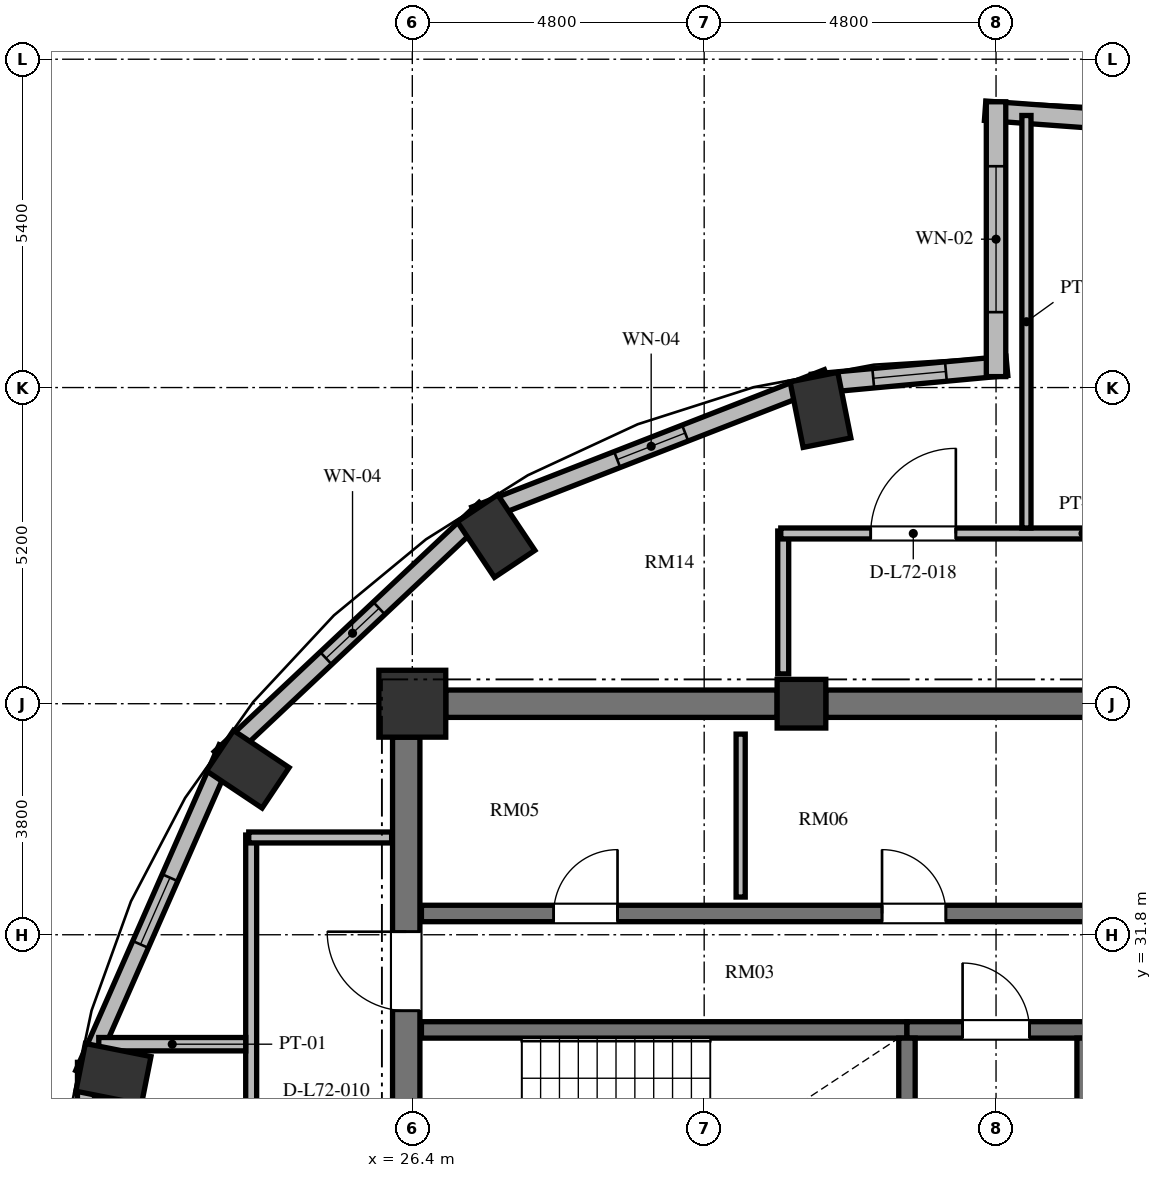
"""IFC4 building model, lengths in metres.
Left out: names, types, materials, properties, quantities, classifications, styles, units other than length and angle.
Written with IfcOpenShell. Run it as: python <this file> out.ifc"""

import sys

from ifc_helpers import new_model, si_unit, direction, frame, frame_2d, origin, origin_2d, place, context, subcontext, project, spatial, rectangle, extrude, element, fill, save


model = new_model("IFC4")
c1 = context("Model", 3, precision=1e-05, world=origin(), true_north=direction((0.0, 1.0)))
c2 = subcontext(c1, "Body", "Model", "MODEL_VIEW")
j1 = project(units=[si_unit("LENGTHUNIT", "METRE"), si_unit("PLANEANGLEUNIT", "RADIAN")], contexts=[c1])
p1 = place(None, origin())
s1 = spatial("IfcSite", under=j1, at=p1, CompositionType="ELEMENT")
p2 = place(p1, origin())
s2 = spatial("IfcBuilding", under=s1, at=p2, CompositionType="ELEMENT")
p3 = place(p2, frame((0.0, 0.0, 276.912)))
s3 = spatial("IfcBuildingStorey", under=s2, at=p3, CompositionType="ELEMENT", Elevation=276.912)
for number, where, z_axis, x_axis in (
    (1, (33.113, 40.433, 0.0), (0.0, 0.0, 1.0), (-0.195, 0.981, 0.0)),
    (2, (27.778, 38.357, 0.0), (0.0, 0.0, 1.0), (-0.556, 0.831, 0.0)),
    (3, (23.694, 34.522, 0.0), (0.0, 0.0, 1.0), (-0.831, 0.556, 0.0)),
    (4, (21.484, 29.512, 0.0), (0.0, 0.0, 1.0), (-0.981, 0.195, 0.0)),
):
    element("IfcColumn", number, at=place(p3, frame(where, z_axis=z_axis, x_axis=x_axis)), inside=s3, PredefinedType="COLUMN", context=c2, shape_type="SweptSolid", body=[
        extrude(rectangle(XDim=1.1, YDim=0.8, at=origin_2d()), origin(), (0.0, 0.0, 1.0), 3.648),
    ])
p4 = place(p3, frame((32.8, 35.6, 0.0), z_axis=(0.0, 0.0, 1.0), x_axis=(1.0, 0.0, 0.0)))
e5 = element("IfcColumn", 5, at=p4, inside=s3, PredefinedType="COLUMN", context=c2, shape_type="SweptSolid", body=[
    extrude(rectangle(XDim=0.8, YDim=0.8, at=origin_2d()), origin(), (0.0, 0.0, 1.0), 3.648),
])
p5 = place(p3, frame((26.4, 35.6, 0.0), z_axis=(0.0, 0.0, 1.0), x_axis=(1.0, 0.0, 0.0)))
e6 = element("IfcColumn", 6, at=p5, inside=s3, PredefinedType="COLUMN", context=c2, shape_type="SweptSolid", body=[
    extrude(rectangle(XDim=1.1, YDim=1.1, at=origin_2d()), origin(), (0.0, 0.0, 1.0), 3.648),
])
p6 = place(p3, frame((26.3, 20.95, 0.0), z_axis=(0.0, 0.0, 1.0), x_axis=(0.0, 1.0, 0.0)))
e7 = element("IfcWall", 7, at=p6, inside=s3, PredefinedType="SHEAR", context=c2, shape_type="SweptSolid", body=[
    extrude(rectangle(XDim=14.1, YDim=0.45, at=frame_2d((7.05, 0.0))), origin(), (0.0, 0.0, 1.0), 3.648),
])
p7 = place(p6, frame((6.5, 0.0, 0.0)))
e8 = element("IfcOpeningElement", 8, at=p7, cuts=e7, PredefinedType="OPENING", context=c2, shape_type="SweptSolid", body=[
    extrude(rectangle(XDim=1.2, YDim=2.15, at=frame_2d((0.6, 1.075))), frame((0.0, 0.235, 0.0), z_axis=(0.0, -1.0, 0.0), x_axis=(1.0, 0.0, 0.0)), (0.0, 0.0, 1.0), 0.47),
])
p8 = place(p6, frame((9.6, 0.0, 0.0)))
e9 = element("IfcOpeningElement", 9, at=p8, cuts=e7, PredefinedType="OPENING", context=c2, shape_type="SweptSolid", body=[
    extrude(rectangle(XDim=1.3, YDim=2.2, at=frame_2d((0.65, 1.1))), frame((0.0, 0.235, 0.0), z_axis=(0.0, -1.0, 0.0), x_axis=(1.0, 0.0, 0.0)), (0.0, 0.0, 1.0), 0.47),
])
p9 = place(p6, frame((3.26, 0.0, 0.0)))
e10 = element("IfcOpeningElement", 10, at=p9, cuts=e7, PredefinedType="OPENING", context=c2, shape_type="SweptSolid", body=[
    extrude(rectangle(XDim=1.3, YDim=2.2, at=frame_2d((0.65, 1.1))), frame((0.0, 0.235, 0.0), z_axis=(0.0, -1.0, 0.0), x_axis=(1.0, 0.0, 0.0)), (0.0, 0.0, 1.0), 0.47),
])
p10 = place(p3, frame((26.95, 35.6, 0.0), z_axis=(0.0, 0.0, 1.0), x_axis=(1.0, 0.0, 0.0)))
e11 = element("IfcWall", 11, at=p10, inside=s3, PredefinedType="SHEAR", context=c2, shape_type="SweptSolid", body=[
    extrude(rectangle(XDim=5.45, YDim=0.45, at=frame_2d((2.725, 0.0))), origin(), (0.0, 0.0, 1.0), 3.648),
])
p11 = place(p3, frame((33.2, 35.6, 0.0), z_axis=(0.0, 0.0, 1.0), x_axis=(1.0, 0.0, 0.0)))
e12 = element("IfcWall", 12, at=p11, inside=s3, PredefinedType="SHEAR", context=c2, shape_type="SweptSolid", body=[
    extrude(rectangle(XDim=5.6, YDim=0.45, at=frame_2d((2.8, 0.0))), origin(), (0.0, 0.0, 1.0), 3.648),
])
p12 = place(p3, frame((33.228, 40.964, 0.0), z_axis=(0.0, 0.0, 1.0), x_axis=(-0.931716550814, -0.36318627306, 0.0)))
e13 = element("IfcWall", 13, at=p12, inside=s3, PredefinedType="SOLIDWALL", context=c2, shape_type="SweptSolid", body=[
    extrude(rectangle(XDim=6.224, YDim=0.28, at=frame_2d((3.112, 0.0))), origin(), (0.0, 0.0, 1.0), 3.448),
])
p13 = place(p12, frame((2.512, 0.0, 0.85)))
e14 = element("IfcOpeningElement", 14, at=p13, cuts=e13, PredefinedType="OPENING", context=c2, shape_type="SweptSolid", body=[
    extrude(rectangle(XDim=1.2, YDim=1.8, at=frame_2d((0.6, 0.9))), frame((0.0, 0.15, 0.0), z_axis=(0.0, -1.0, 0.0), x_axis=(1.0, 0.0, 0.0)), (0.0, 0.0, 1.0), 0.3),
])
p14 = place(p3, frame((27.595, 38.808, 0.0), z_axis=(0.0, 0.0, 1.0), x_axis=(-0.728251519923, -0.685309947199, 0.0)))
e15 = element("IfcWall", 15, at=p14, inside=s3, PredefinedType="SOLIDWALL", context=c2, shape_type="SweptSolid", body=[
    extrude(rectangle(XDim=5.981, YDim=0.28, at=frame_2d((2.99, 0.0))), origin(), (0.0, 0.0, 1.0), 3.448),
])
p15 = place(p14, frame((2.391, 0.0, 0.85)))
e16 = element("IfcOpeningElement", 16, at=p15, cuts=e15, PredefinedType="OPENING", context=c2, shape_type="SweptSolid", body=[
    extrude(rectangle(XDim=1.2, YDim=1.8, at=frame_2d((0.6, 0.9))), frame((0.0, 0.15, 0.0), z_axis=(0.0, -1.0, 0.0), x_axis=(1.0, 0.0, 0.0)), (0.0, 0.0, 1.0), 0.3),
])
p16 = place(p3, frame((23.352, 34.869, 0.0), z_axis=(0.0, 0.0, 1.0), x_axis=(-0.402882523888, -0.915251698685, 0.0)))
e17 = element("IfcWall", 17, at=p16, inside=s3, PredefinedType="SOLIDWALL", context=c2, shape_type="SweptSolid", body=[
    extrude(rectangle(XDim=5.856, YDim=0.28, at=frame_2d((2.928, 0.0))), origin(), (0.0, 0.0, 1.0), 3.448),
])
p17 = place(p16, frame((2.328, 0.0, 0.85)))
e18 = element("IfcOpeningElement", 18, at=p17, cuts=e17, PredefinedType="OPENING", context=c2, shape_type="SweptSolid", body=[
    extrude(rectangle(XDim=1.2, YDim=1.8, at=frame_2d((0.6, 0.9))), frame((0.0, 0.15, 0.0), z_axis=(0.0, -1.0, 0.0), x_axis=(1.0, 0.0, 0.0)), (0.0, 0.0, 1.0), 0.3),
])
p18 = place(p3, frame((21.033, 29.701, 0.0), z_axis=(0.0, 0.0, 1.0), x_axis=(0.0, -1.0, 0.0)))
e19 = element("IfcWall", 19, at=p18, inside=s3, PredefinedType="SOLIDWALL", context=c2, shape_type="SweptSolid", body=[
    extrude(rectangle(XDim=5.803, YDim=0.28, at=frame_2d((2.901, 0.0))), origin(), (0.0, 0.0, 1.0), 3.448),
])
p19 = place(p18, frame((2.187, 0.0, 0.85)))
e20 = element("IfcOpeningElement", 20, at=p19, cuts=e19, PredefinedType="OPENING", context=c2, shape_type="SweptSolid", body=[
    extrude(rectangle(XDim=1.2, YDim=1.8, at=frame_2d((0.6, 0.9))), frame((0.0, 0.15, 0.0), z_axis=(0.0, -1.0, 0.0), x_axis=(1.0, 0.0, 0.0)), (0.0, 0.0, 1.0), 0.3),
])
p20 = place(p3, frame((40.35, 45.026, 0.0), z_axis=(0.0, 0.0, 1.0), x_axis=(-0.997412917451, 0.071885131294, 0.0)))
e21 = element("IfcWall", 21, at=p20, inside=s3, PredefinedType="SOLIDWALL", context=c2, shape_type="SweptSolid", body=[
    extrude(rectangle(XDim=4.541, YDim=0.32, at=frame_2d((2.271, 0.0))), origin(), (0.0, 0.0, 1.0), 3.448),
])
p21 = place(p20, frame((1.67, 0.0, 0.85)))
e22 = element("IfcOpeningElement", 22, at=p21, cuts=e21, PredefinedType="OPENING", context=c2, shape_type="SweptSolid", body=[
    extrude(rectangle(XDim=1.2, YDim=2.2, at=frame_2d((0.6, 1.1))), frame((0.0, 0.17, 0.0), z_axis=(0.0, -1.0, 0.0), x_axis=(1.0, 0.0, 0.0)), (0.0, 0.0, 1.0), 0.34),
])
p22 = place(p3, frame((36.179, 41.156, 0.0), z_axis=(0.0, 0.0, 1.0), x_axis=(-0.995736155144, -0.092247001792, 0.0)))
e23 = element("IfcWall", 23, at=p22, inside=s3, PredefinedType="SOLIDWALL", context=c2, shape_type="SweptSolid", body=[
    extrude(rectangle(XDim=3.216, YDim=0.32, at=frame_2d((1.608, 0.0))), origin(), (0.0, 0.0, 1.0), 3.448),
])
p23 = place(p22, frame((1.008, 0.0, 0.85)))
e24 = element("IfcOpeningElement", 24, at=p23, cuts=e23, PredefinedType="OPENING", context=c2, shape_type="SweptSolid", body=[
    extrude(rectangle(XDim=1.2, YDim=1.8, at=frame_2d((0.6, 0.9))), frame((0.0, 0.17, 0.0), z_axis=(0.0, -1.0, 0.0), x_axis=(1.0, 0.0, 0.0)), (0.0, 0.0, 1.0), 0.34),
])
p24 = place(p3, frame((36.0, 45.5, 0.0), z_axis=(0.0, 0.0, 1.0), x_axis=(0.0, -1.0, 0.0)))
e25 = element("IfcWall", 25, at=p24, inside=s3, PredefinedType="SOLIDWALL", context=c2, shape_type="SweptSolid", body=[
    extrude(rectangle(XDim=4.52, YDim=0.32, at=frame_2d((2.26, 0.0))), origin(), (0.0, 0.0, 1.0), 3.448),
])
p25 = place(p24, frame((1.06, 0.0, 0.84)))
e26 = element("IfcOpeningElement", 26, at=p25, cuts=e25, PredefinedType="OPENING", context=c2, shape_type="SweptSolid", body=[
    extrude(rectangle(XDim=2.4, YDim=2.04, at=frame_2d((1.2, 1.02))), frame((0.0, 0.17, 0.0), z_axis=(0.0, -1.0, 0.0), x_axis=(1.0, 0.0, 0.0)), (0.0, 0.0, 1.0), 0.34),
])
p26 = place(p3, frame((26.55, 30.235, 0.0), z_axis=(0.0, 0.0, 1.0), x_axis=(1.0, 0.0, 0.0)))
e27 = element("IfcWall", 27, at=p26, inside=s3, PredefinedType="SHEAR", context=c2, shape_type="SweptSolid", body=[
    extrude(rectangle(XDim=7.985, YDim=0.27, at=frame_2d((3.992, 0.0))), origin(), (0.0, 0.0, 1.0), 3.648),
])
p27 = place(p3, frame((34.535, 30.235, 0.0), z_axis=(0.0, 0.0, 1.0), x_axis=(1.0, 0.0, 0.0)))
e28 = element("IfcWall", 28, at=p27, inside=s3, PredefinedType="SHEAR", context=c2, shape_type="SweptSolid", body=[
    extrude(rectangle(XDim=2.93, YDim=0.27, at=frame_2d((1.465, 0.0))), origin(), (0.0, 0.0, 1.0), 3.648),
])
p28 = place(p27, frame((0.915, 0.0, 0.0)))
e29 = element("IfcOpeningElement", 29, at=p28, cuts=e28, PredefinedType="OPENING", context=c2, shape_type="SweptSolid", body=[
    extrude(rectangle(XDim=1.1, YDim=2.15, at=frame_2d((0.55, 1.075))), frame((0.0, 0.145, 0.0), z_axis=(0.0, -1.0, 0.0), x_axis=(1.0, 0.0, 0.0)), (0.0, 0.0, 1.0), 0.29),
])
for number, where, z_axis, x_axis in (
    (30, (34.535, 26.02, 0.0), (0.0, 0.0, 1.0), (0.0, 1.0, 0.0)),
    (31, (37.465, 26.02, 0.0), (0.0, 0.0, 1.0), (0.0, 1.0, 0.0)),
):
    element("IfcWall", number, at=place(p3, frame(where, z_axis=z_axis, x_axis=x_axis)), inside=s3, PredefinedType="SHEAR", context=c2, shape_type="SweptSolid", body=[
        extrude(rectangle(XDim=4.08, YDim=0.27, at=frame_2d((2.04, 0.0))), origin(), (0.0, 0.0, 1.0), 3.648),
    ])
p29 = place(p3, frame((26.55, 32.15, 0.0), z_axis=(0.0, 0.0, 1.0), x_axis=(1.0, 0.0, 0.0)))
e32 = element("IfcWall", 32, at=p29, inside=s3, PredefinedType="SHEAR", context=c2, shape_type="SweptSolid", body=[
    extrude(rectangle(XDim=16.4, YDim=0.27, at=frame_2d((8.2, 0.0))), origin(), (0.0, 0.0, 1.0), 3.648),
])
p30 = place(p29, frame((2.175, 0.0, 0.0)))
e33 = element("IfcOpeningElement", 33, at=p30, cuts=e32, PredefinedType="OPENING", context=c2, shape_type="SweptSolid", body=[
    extrude(rectangle(XDim=1.05, YDim=2.15, at=frame_2d((0.525, 1.075))), frame((0.0, 0.145, 0.0), z_axis=(0.0, -1.0, 0.0), x_axis=(1.0, 0.0, 0.0)), (0.0, 0.0, 1.0), 0.29),
])
p31 = place(p29, frame((7.575, 0.0, 0.0)))
e34 = element("IfcOpeningElement", 34, at=p31, cuts=e32, PredefinedType="OPENING", context=c2, shape_type="SweptSolid", body=[
    extrude(rectangle(XDim=1.05, YDim=2.15, at=frame_2d((0.525, 1.075))), frame((0.0, 0.145, 0.0), z_axis=(0.0, -1.0, 0.0), x_axis=(1.0, 0.0, 0.0)), (0.0, 0.0, 1.0), 0.29),
])
p32 = place(p29, frame((11.9, 0.0, 0.0)))
e35 = element("IfcOpeningElement", 35, at=p32, cuts=e32, PredefinedType="OPENING", context=c2, shape_type="SweptSolid", body=[
    extrude(rectangle(XDim=1.1, YDim=2.2, at=frame_2d((0.55, 1.1))), frame((0.0, 0.145, 0.0), z_axis=(0.0, -1.0, 0.0), x_axis=(1.0, 0.0, 0.0)), (0.0, 0.0, 1.0), 0.29),
])
p33 = place(p29, frame((14.5, 0.0, 0.0)))
e36 = element("IfcOpeningElement", 36, at=p33, cuts=e32, PredefinedType="OPENING", context=c2, shape_type="SweptSolid", body=[
    extrude(rectangle(XDim=1.1, YDim=2.2, at=frame_2d((0.55, 1.1))), frame((0.0, 0.145, 0.0), z_axis=(0.0, -1.0, 0.0), x_axis=(1.0, 0.0, 0.0)), (0.0, 0.0, 1.0), 0.29),
])
p34 = place(p3, frame((31.8, 32.42, 0.0), z_axis=(0.0, 0.0, 1.0), x_axis=(0.0, 1.0, 0.0)))
e37 = element("IfcWall", 37, at=p34, inside=s3, PredefinedType="PARTITIONING", context=c2, shape_type="SweptSolid", body=[
    extrude(rectangle(XDim=2.68, YDim=0.15, at=frame_2d((1.34, 0.0))), origin(), (0.0, 0.0, 1.0), 3.448),
])
p35 = place(p3, frame((32.5, 36.09, 0.0), z_axis=(0.0, 0.0, 1.0), x_axis=(0.0, 1.0, 0.0)))
e38 = element("IfcWall", 38, at=p35, inside=s3, PredefinedType="PARTITIONING", context=c2, shape_type="SweptSolid", body=[
    extrude(rectangle(XDim=2.35, YDim=0.18, at=frame_2d((1.175, 0.0))), origin(), (0.0, 0.0, 1.0), 3.448),
])
p36 = place(p3, frame((32.46, 38.4, 0.0), z_axis=(0.0, 0.0, 1.0), x_axis=(1.0, 0.0, 0.0)))
e39 = element("IfcWall", 39, at=p36, inside=s3, PredefinedType="PARTITIONING", context=c2, shape_type="SweptSolid", body=[
    extrude(rectangle(XDim=19.879, YDim=0.18, at=frame_2d((9.939, 0.0))), origin(), (0.0, 0.0, 1.0), 3.073),
])
p37 = place(p36, frame((16.101, 0.0, 0.0)))
e40 = element("IfcOpeningElement", 40, at=p37, cuts=e39, PredefinedType="OPENING", context=c2, shape_type="SweptSolid", body=[
    extrude(rectangle(XDim=1.4, YDim=2.2, at=frame_2d((0.7, 1.1))), frame((0.0, 0.1, 0.0), z_axis=(0.0, -1.0, 0.0), x_axis=(1.0, 0.0, 0.0)), (0.0, 0.0, 1.0), 0.2),
])
p38 = place(p36, frame((10.84, 0.0, 0.0)))
e41 = element("IfcOpeningElement", 41, at=p38, cuts=e39, PredefinedType="OPENING", context=c2, shape_type="SweptSolid", body=[
    extrude(rectangle(XDim=1.4, YDim=2.2, at=frame_2d((0.7, 1.1))), frame((0.0, 0.1, 0.0), z_axis=(0.0, -1.0, 0.0), x_axis=(1.0, 0.0, 0.0)), (0.0, 0.0, 1.0), 0.2),
])
p39 = place(p36, frame((5.84, 0.0, 0.0)))
e42 = element("IfcOpeningElement", 42, at=p39, cuts=e39, PredefinedType="OPENING", context=c2, shape_type="SweptSolid", body=[
    extrude(rectangle(XDim=1.4, YDim=2.2, at=frame_2d((0.7, 1.1))), frame((0.0, 0.1, 0.0), z_axis=(0.0, -1.0, 0.0), x_axis=(1.0, 0.0, 0.0)), (0.0, 0.0, 1.0), 0.2),
])
p40 = place(p36, frame((1.479, 0.0, 0.0)))
e43 = element("IfcOpeningElement", 43, at=p40, cuts=e39, PredefinedType="OPENING", context=c2, shape_type="SweptSolid", body=[
    extrude(rectangle(XDim=1.4, YDim=2.2, at=frame_2d((0.7, 1.1))), frame((0.0, 0.1, 0.0), z_axis=(0.0, -1.0, 0.0), x_axis=(1.0, 0.0, 0.0)), (0.0, 0.0, 1.0), 0.2),
])
p41 = place(p3, frame((23.75, 22.16, 0.0), z_axis=(0.0, 0.0, 1.0), x_axis=(0.0, 1.0, 0.0)))
e44 = element("IfcWall", 44, at=p41, inside=s3, PredefinedType="PARTITIONING", context=c2, shape_type="SweptSolid", body=[
    extrude(rectangle(XDim=11.28, YDim=0.18, at=frame_2d((5.64, 0.0))), origin(), (0.0, 0.0, 1.0), 3.448),
])
p42 = place(p41, frame((5.123, 0.0, 0.0)))
e45 = element("IfcOpeningElement", 45, at=p42, cuts=e44, PredefinedType="OPENING", context=c2, shape_type="SweptSolid", body=[
    extrude(rectangle(XDim=1.4, YDim=2.2, at=frame_2d((0.7, 1.1))), frame((0.0, 0.1, 0.0), z_axis=(0.0, -1.0, 0.0), x_axis=(1.0, 0.0, 0.0)), (0.0, 0.0, 1.0), 0.2),
])
p43 = place(p41, frame((1.379, 0.0, 0.0)))
e46 = element("IfcOpeningElement", 46, at=p43, cuts=e44, PredefinedType="OPENING", context=c2, shape_type="SweptSolid", body=[
    extrude(rectangle(XDim=1.4, YDim=2.2, at=frame_2d((0.7, 1.1))), frame((0.0, 0.1, 0.0), z_axis=(0.0, -1.0, 0.0), x_axis=(1.0, 0.0, 0.0)), (0.0, 0.0, 1.0), 0.2),
])
p44 = place(p3, frame((23.71, 33.4, 0.0), z_axis=(0.0, 0.0, 1.0), x_axis=(1.0, 0.0, 0.0)))
e47 = element("IfcWall", 47, at=p44, inside=s3, PredefinedType="PARTITIONING", context=c2, shape_type="SweptSolid", body=[
    extrude(rectangle(XDim=2.35, YDim=0.18, at=frame_2d((1.175, 0.0))), origin(), (0.0, 0.0, 1.0), 3.448),
])
p45 = place(p3, frame((21.244, 30.0, 0.0), z_axis=(0.0, 0.0, 1.0), x_axis=(1.0, 0.0, 0.0)))
e48 = element("IfcWall", 48, at=p45, inside=s3, PredefinedType="PARTITIONING", context=c2, shape_type="SweptSolid", body=[
    extrude(rectangle(XDim=2.416, YDim=0.22, at=frame_2d((1.208, 0.0))), origin(), (0.0, 0.0, 1.0), 3.448),
])
p46 = place(p3, frame((36.5, 38.49, 0.0), z_axis=(0.0, 0.0, 1.0), x_axis=(0.0, 1.0, 0.0)))
e49 = element("IfcWall", 49, at=p46, inside=s3, PredefinedType="PARTITIONING", context=c2, shape_type="SweptSolid", body=[
    extrude(rectangle(XDim=6.785, YDim=0.15, at=frame_2d((3.392, 0.0))), origin(), (0.0, 0.0, 1.0), 3.448),
])
p47 = place(p13, origin())
e50 = element("IfcWindow", 50, at=p47, inside=s3, PartitioningType="SINGLE_PANEL", PredefinedType="WINDOW", context=c2, shape_type="SweptSolid", body=[
    extrude(rectangle(XDim=1.2, YDim=1.8, at=frame_2d((0.6, 0.9))), frame((0.0, 0.03, 0.0), z_axis=(0.0, -1.0, 0.0), x_axis=(1.0, 0.0, 0.0)), (0.0, 0.0, 1.0), 0.06),
])
fill(e14, e50)
p48 = place(p15, origin())
e51 = element("IfcWindow", 51, at=p48, inside=s3, PartitioningType="SINGLE_PANEL", PredefinedType="WINDOW", context=c2, shape_type="SweptSolid", body=[
    extrude(rectangle(XDim=1.2, YDim=1.8, at=frame_2d((0.6, 0.9))), frame((0.0, 0.03, 0.0), z_axis=(0.0, -1.0, 0.0), x_axis=(1.0, 0.0, 0.0)), (0.0, 0.0, 1.0), 0.06),
])
fill(e16, e51)
p49 = place(p17, origin())
e52 = element("IfcWindow", 52, at=p49, inside=s3, PartitioningType="SINGLE_PANEL", PredefinedType="WINDOW", context=c2, shape_type="SweptSolid", body=[
    extrude(rectangle(XDim=1.2, YDim=1.8, at=frame_2d((0.6, 0.9))), frame((0.0, 0.03, 0.0), z_axis=(0.0, -1.0, 0.0), x_axis=(1.0, 0.0, 0.0)), (0.0, 0.0, 1.0), 0.06),
])
fill(e18, e52)
p50 = place(p23, origin())
e53 = element("IfcWindow", 53, at=p50, inside=s3, PartitioningType="SINGLE_PANEL", PredefinedType="WINDOW", context=c2, shape_type="SweptSolid", body=[
    extrude(rectangle(XDim=1.2, YDim=1.8, at=frame_2d((0.6, 0.9))), frame((0.0, 0.03, 0.0), z_axis=(0.0, -1.0, 0.0), x_axis=(1.0, 0.0, 0.0)), (0.0, 0.0, 1.0), 0.06),
])
fill(e24, e53)
p51 = place(p25, origin())
e54 = element("IfcWindow", 54, at=p51, inside=s3, PartitioningType="SINGLE_PANEL", PredefinedType="WINDOW", context=c2, shape_type="SweptSolid", body=[
    extrude(rectangle(XDim=2.4, YDim=2.04, at=frame_2d((1.2, 1.02))), frame((0.0, 0.03, 0.0), z_axis=(0.0, -1.0, 0.0), x_axis=(1.0, 0.0, 0.0)), (0.0, 0.0, 1.0), 0.06),
])
fill(e26, e54)
p52 = place(p28, origin())
e55 = element("IfcDoor", 55, at=p52, inside=s3, OperationType="SINGLE_SWING_LEFT", PredefinedType="DOOR", context=c2, shape_type="SweptSolid", body=[
    extrude(rectangle(XDim=1.1, YDim=2.15, at=frame_2d((0.55, 1.075))), frame((0.0, 0.025, 0.0), z_axis=(0.0, -1.0, 0.0), x_axis=(1.0, 0.0, 0.0)), (0.0, 0.0, 1.0), 0.05),
])
fill(e29, e55)
p53 = place(p8, origin())
e56 = element("IfcDoor", 56, at=p53, inside=s3, OperationType="SINGLE_SWING_RIGHT", PredefinedType="DOOR", context=c2, shape_type="SweptSolid", body=[
    extrude(rectangle(XDim=1.3, YDim=2.2, at=frame_2d((0.65, 1.1))), frame((0.0, 0.025, 0.0), z_axis=(0.0, -1.0, 0.0), x_axis=(1.0, 0.0, 0.0)), (0.0, 0.0, 1.0), 0.05),
])
fill(e9, e56)
p54 = place(p30, origin())
e57 = element("IfcDoor", 57, at=p54, inside=s3, OperationType="SINGLE_SWING_RIGHT", PredefinedType="DOOR", context=c2, shape_type="SweptSolid", body=[
    extrude(rectangle(XDim=1.05, YDim=2.15, at=frame_2d((0.525, 1.075))), frame((0.0, 0.025, 0.0), z_axis=(0.0, -1.0, 0.0), x_axis=(1.0, 0.0, 0.0)), (0.0, 0.0, 1.0), 0.05),
])
fill(e33, e57)
p55 = place(p31, origin())
e58 = element("IfcDoor", 58, at=p55, inside=s3, OperationType="SINGLE_SWING_LEFT", PredefinedType="DOOR", context=c2, shape_type="SweptSolid", body=[
    extrude(rectangle(XDim=1.05, YDim=2.15, at=frame_2d((0.525, 1.075))), frame((0.0, 0.025, 0.0), z_axis=(0.0, -1.0, 0.0), x_axis=(1.0, 0.0, 0.0)), (0.0, 0.0, 1.0), 0.05),
])
fill(e34, e58)
p56 = place(p40, origin())
e59 = element("IfcDoor", 59, at=p56, inside=s3, OperationType="SINGLE_SWING_RIGHT", PredefinedType="DOOR", context=c2, shape_type="SweptSolid", body=[
    extrude(rectangle(XDim=1.4, YDim=2.2, at=frame_2d((0.7, 1.1))), frame((0.0, 0.025, 0.0), z_axis=(0.0, -1.0, 0.0), x_axis=(1.0, 0.0, 0.0)), (0.0, 0.0, 1.0), 0.05),
])
fill(e43, e59)
save(model, sys.argv[1])
